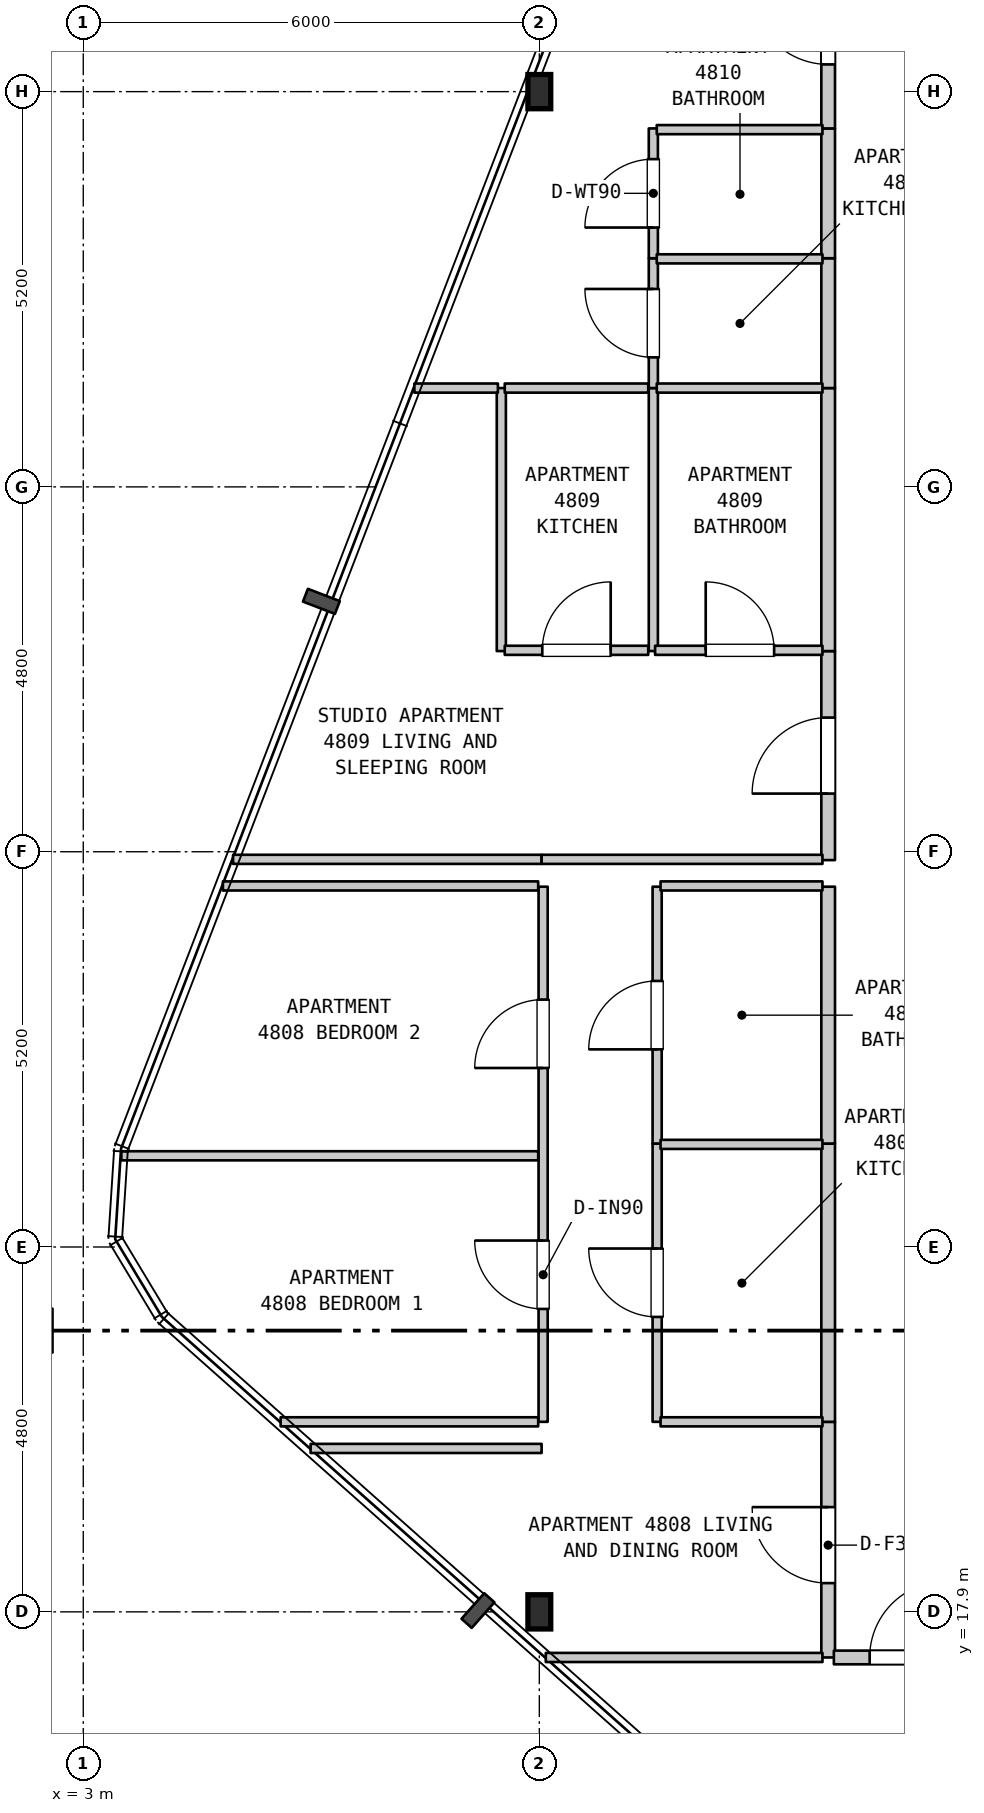
"""IFC4 building model, lengths in metres.
Left out: names, types, materials, properties, quantities, classifications, styles, units other than length and angle.
Written with IfcOpenShell. Run it as: python <this file> out.ifc"""

import sys

from ifc_helpers import new_model, si_unit, direction, frame, frame_2d, origin, origin_2d, place, context, subcontext, project, spatial, rectangle, i_section, extrude, element, fill, save


model = new_model("IFC4")
c1 = context("Model", 3, precision=1e-05, world=origin(), true_north=direction((0.0, 1.0)))
c2 = subcontext(c1, "Body", "Model", "MODEL_VIEW")
j1 = project(units=[si_unit("LENGTHUNIT", "METRE"), si_unit("PLANEANGLEUNIT", "RADIAN")], contexts=[c1])
p1 = place(None, origin())
s1 = spatial("IfcSite", under=j1, at=p1, CompositionType="ELEMENT")
p2 = place(p1, origin())
s2 = spatial("IfcBuilding", under=s1, at=p2, CompositionType="ELEMENT")
p3 = place(p2, frame((0.0, 0.0, 195.8)))
s3 = spatial("IfcBuildingStorey", under=s2, at=p3, CompositionType="ELEMENT", Elevation=195.8)
for number, where, z_axis, x_axis in (
    (1, (9.0, 17.9, 0.0), (0.0, 0.0, 1.0), (1.0, 0.0, 0.0)),
    (2, (9.0, 37.9, 0.0), (0.0, 0.0, 1.0), (1.0, 0.0, 0.0)),
):
    element("IfcColumn", number, at=place(p3, frame(where, z_axis=z_axis, x_axis=x_axis)), inside=s3, PredefinedType="COLUMN", context=c2, shape_type="SweptSolid", body=[
        extrude(i_section(OverallWidth=0.3, OverallDepth=0.45, WebThickness=0.014, FlangeThickness=0.026, FilletRadius=0.027, at=origin_2d()), origin(), (0.0, 0.0, 1.0), 3.7),
    ])
p4 = place(p3, frame((8.5, 30.54, 0.0), z_axis=(0.0, 0.0, 1.0), x_axis=(0.0, 1.0, 0.0)))
e3 = element("IfcWall", 3, at=p4, inside=s3, PredefinedType="PARTITIONING", context=c2, shape_type="SweptSolid", body=[
    extrude(rectangle(XDim=3.46, YDim=0.12, at=frame_2d((1.73, 0.0))), origin(), (0.0, 0.0, 1.0), 3.39),
])
p5 = place(p3, frame((9.05, 20.4, 0.0), z_axis=(0.0, 0.0, 1.0), x_axis=(0.0, 1.0, 0.0)))
e4 = element("IfcWall", 4, at=p5, inside=s3, PredefinedType="PARTITIONING", context=c2, shape_type="SweptSolid", body=[
    extrude(rectangle(XDim=7.04, YDim=0.12, at=frame_2d((3.52, 0.0))), origin(), (0.0, 0.0, 1.0), 2.79),
])
p6 = place(p5, frame((1.485, 0.0, 0.0)))
e5 = element("IfcOpeningElement", 5, at=p6, cuts=e4, PredefinedType="OPENING", context=c2, shape_type="SweptSolid", body=[
    extrude(rectangle(XDim=0.9, YDim=2.15, at=frame_2d((0.45, 1.075))), frame((0.0, 0.07, 0.0), z_axis=(0.0, -1.0, 0.0), x_axis=(1.0, 0.0, 0.0)), (0.0, 0.0, 1.0), 0.14),
])
p7 = place(p5, frame((4.655, 0.0, 0.0)))
e6 = element("IfcOpeningElement", 6, at=p7, cuts=e4, PredefinedType="OPENING", context=c2, shape_type="SweptSolid", body=[
    extrude(rectangle(XDim=0.9, YDim=2.15, at=frame_2d((0.45, 1.075))), frame((0.0, 0.07, 0.0), z_axis=(0.0, -1.0, 0.0), x_axis=(1.0, 0.0, 0.0)), (0.0, 0.0, 1.0), 0.14),
])
p8 = place(p3, frame((10.5, 30.54, 0.0), z_axis=(0.0, 0.0, 1.0), x_axis=(0.0, 1.0, 0.0)))
e7 = element("IfcWall", 7, at=p8, inside=s3, PredefinedType="PARTITIONING", context=c2, shape_type="SweptSolid", body=[
    extrude(rectangle(XDim=3.46, YDim=0.12, at=frame_2d((1.73, 0.0))), origin(), (0.0, 0.0, 1.0), 3.39),
])
p9 = place(p3, frame((10.5, 34.0, 0.0), z_axis=(0.0, 0.0, 1.0), x_axis=(0.0, 1.0, 0.0)))
e8 = element("IfcWall", 8, at=p9, inside=s3, PredefinedType="PARTITIONING", context=c2, shape_type="SweptSolid", body=[
    extrude(rectangle(XDim=1.708, YDim=0.12, at=frame_2d((0.854, 0.0))), origin(), (0.0, 0.0, 1.0), 3.39),
])
p10 = place(p9, frame((0.404, 0.0, 0.0)))
e9 = element("IfcOpeningElement", 9, at=p10, cuts=e8, PredefinedType="OPENING", context=c2, shape_type="SweptSolid", body=[
    extrude(rectangle(XDim=0.9, YDim=2.15, at=frame_2d((0.45, 1.075))), frame((0.0, 0.07, 0.0), z_axis=(0.0, -1.0, 0.0), x_axis=(1.0, 0.0, 0.0)), (0.0, 0.0, 1.0), 0.14),
])
p11 = place(p3, frame((10.5, 35.708, 0.0), z_axis=(0.0, 0.0, 1.0), x_axis=(0.0, 1.0, 0.0)))
e10 = element("IfcWall", 10, at=p11, inside=s3, PredefinedType="PARTITIONING", context=c2, shape_type="SweptSolid", body=[
    extrude(rectangle(XDim=1.708, YDim=0.12, at=frame_2d((0.854, 0.0))), origin(), (0.0, 0.0, 1.0), 3.39),
])
p12 = place(p11, frame((0.404, 0.0, 0.0)))
e11 = element("IfcOpeningElement", 11, at=p12, cuts=e10, PredefinedType="OPENING", context=c2, shape_type="SweptSolid", body=[
    extrude(rectangle(XDim=0.9, YDim=2.1, at=frame_2d((0.45, 1.05))), frame((0.0, 0.07, 0.0), z_axis=(0.0, -1.0, 0.0), x_axis=(1.0, 0.0, 0.0)), (0.0, 0.0, 1.0), 0.14),
])
p13 = place(p3, frame((10.55, 20.4, 0.0), z_axis=(0.0, 0.0, 1.0), x_axis=(0.0, 1.0, 0.0)))
e12 = element("IfcWall", 12, at=p13, inside=s3, PredefinedType="PARTITIONING", context=c2, shape_type="SweptSolid", body=[
    extrude(rectangle(XDim=3.661, YDim=0.12, at=frame_2d((1.831, 0.0))), origin(), (0.0, 0.0, 1.0), 3.39),
])
p14 = place(p13, frame((1.38, 0.0, 0.0)))
e13 = element("IfcOpeningElement", 13, at=p14, cuts=e12, PredefinedType="OPENING", context=c2, shape_type="SweptSolid", body=[
    extrude(rectangle(XDim=0.9, YDim=2.15, at=frame_2d((0.45, 1.075))), frame((0.0, 0.07, 0.0), z_axis=(0.0, -1.0, 0.0), x_axis=(1.0, 0.0, 0.0)), (0.0, 0.0, 1.0), 0.14),
])
p15 = place(p3, frame((10.55, 24.061, 0.0), z_axis=(0.0, 0.0, 1.0), x_axis=(0.0, 1.0, 0.0)))
e14 = element("IfcWall", 14, at=p15, inside=s3, PredefinedType="PARTITIONING", context=c2, shape_type="SweptSolid", body=[
    extrude(rectangle(XDim=3.379, YDim=0.12, at=frame_2d((1.689, 0.0))), origin(), (0.0, 0.0, 1.0), 3.39),
])
p16 = place(p15, frame((1.239, 0.0, 0.0)))
e15 = element("IfcOpeningElement", 15, at=p16, cuts=e14, PredefinedType="OPENING", context=c2, shape_type="SweptSolid", body=[
    extrude(rectangle(XDim=0.9, YDim=2.1, at=frame_2d((0.45, 1.05))), frame((0.0, 0.07, 0.0), z_axis=(0.0, -1.0, 0.0), x_axis=(1.0, 0.0, 0.0)), (0.0, 0.0, 1.0), 0.14),
])
p17 = place(p3, frame((12.8, 17.3, 0.0), z_axis=(0.0, 0.0, 1.0), x_axis=(0.0, 1.0, 0.0)))
e16 = element("IfcWall", 16, at=p17, inside=s3, PredefinedType="STANDARD", context=c2, shape_type="SweptSolid", body=[
    extrude(rectangle(XDim=3.1, YDim=0.18, at=frame_2d((1.55, 0.0))), origin(), (0.0, 0.0, 1.0), 3.39),
])
p18 = place(p17, frame((0.978, 0.0, 0.0)))
e17 = element("IfcOpeningElement", 17, at=p18, cuts=e16, PredefinedType="OPENING", context=c2, shape_type="SweptSolid", body=[
    extrude(rectangle(XDim=1.0, YDim=2.15, at=frame_2d((0.5, 1.075))), frame((0.0, 0.1, 0.0), z_axis=(0.0, -1.0, 0.0), x_axis=(1.0, 0.0, 0.0)), (0.0, 0.0, 1.0), 0.2),
])
p19 = place(p3, frame((12.8, 20.4, 0.0), z_axis=(0.0, 0.0, 1.0), x_axis=(0.0, 1.0, 0.0)))
e18 = element("IfcWall", 18, at=p19, inside=s3, PredefinedType="STANDARD", context=c2, shape_type="SweptSolid", body=[
    extrude(rectangle(XDim=3.661, YDim=0.18, at=frame_2d((1.831, 0.0))), origin(), (0.0, 0.0, 1.0), 3.39),
])
p20 = place(p3, frame((12.8, 24.061, 0.0), z_axis=(0.0, 0.0, 1.0), x_axis=(0.0, 1.0, 0.0)))
e19 = element("IfcWall", 19, at=p20, inside=s3, PredefinedType="STANDARD", context=c2, shape_type="SweptSolid", body=[
    extrude(rectangle(XDim=3.379, YDim=0.18, at=frame_2d((1.689, 0.0))), origin(), (0.0, 0.0, 1.0), 3.39),
])
p21 = place(p3, frame((12.8, 27.79, 0.0), z_axis=(0.0, 0.0, 1.0), x_axis=(0.0, 1.0, 0.0)))
e20 = element("IfcWall", 20, at=p21, inside=s3, PredefinedType="STANDARD", context=c2, shape_type="SweptSolid", body=[
    extrude(rectangle(XDim=2.75, YDim=0.18, at=frame_2d((1.375, 0.0))), origin(), (0.0, 0.0, 1.0), 3.39),
])
p22 = place(p21, frame((0.875, 0.0, 0.0)))
e21 = element("IfcOpeningElement", 21, at=p22, cuts=e20, PredefinedType="OPENING", context=c2, shape_type="SweptSolid", body=[
    extrude(rectangle(XDim=1.0, YDim=2.15, at=frame_2d((0.5, 1.075))), frame((0.0, 0.1, 0.0), z_axis=(0.0, -1.0, 0.0), x_axis=(1.0, 0.0, 0.0)), (0.0, 0.0, 1.0), 0.2),
])
p23 = place(p3, frame((12.8, 30.54, 0.0), z_axis=(0.0, 0.0, 1.0), x_axis=(0.0, 1.0, 0.0)))
e22 = element("IfcWall", 22, at=p23, inside=s3, PredefinedType="STANDARD", context=c2, shape_type="SweptSolid", body=[
    extrude(rectangle(XDim=3.46, YDim=0.18, at=frame_2d((1.73, 0.0))), origin(), (0.0, 0.0, 1.0), 3.39),
])
for number, where, z_axis, x_axis in (
    (23, (12.8, 34.0, 0.0), (0.0, 0.0, 1.0), (0.0, 1.0, 0.0)),
    (24, (12.8, 35.708, 0.0), (0.0, 0.0, 1.0), (0.0, 1.0, 0.0)),
):
    element("IfcWall", number, at=place(p3, frame(where, z_axis=z_axis, x_axis=x_axis)), inside=s3, PredefinedType="STANDARD", context=c2, shape_type="SweptSolid", body=[
        extrude(rectangle(XDim=1.708, YDim=0.18, at=frame_2d((0.854, 0.0))), origin(), (0.0, 0.0, 1.0), 3.39),
    ])
p24 = place(p3, frame((12.8, 37.416, 0.0), z_axis=(0.0, 0.0, 1.0), x_axis=(0.0, 1.0, 0.0)))
e25 = element("IfcWall", 25, at=p24, inside=s3, PredefinedType="STANDARD", context=c2, shape_type="SweptSolid", body=[
    extrude(rectangle(XDim=2.684, YDim=0.18, at=frame_2d((1.342, 0.0))), origin(), (0.0, 0.0, 1.0), 3.39),
])
p25 = place(p24, frame((0.842, 0.0, 0.0)))
e26 = element("IfcOpeningElement", 26, at=p25, cuts=e25, PredefinedType="OPENING", context=c2, shape_type="SweptSolid", body=[
    extrude(rectangle(XDim=1.0, YDim=2.15, at=frame_2d((0.5, 1.075))), frame((0.0, 0.1, 0.0), z_axis=(0.0, -1.0, 0.0), x_axis=(1.0, 0.0, 0.0)), (0.0, 0.0, 1.0), 0.2),
])
p26 = place(p3, frame((9.085, 17.3, 0.0), z_axis=(0.0, 0.0, 1.0), x_axis=(1.0, 0.0, 0.0)))
e27 = element("IfcWall", 27, at=p26, inside=s3, PredefinedType="PARTITIONING", context=c2, shape_type="SweptSolid", body=[
    extrude(rectangle(XDim=3.64, YDim=0.12, at=frame_2d((1.82, 0.0))), origin(), (0.0, 0.0, 1.0), 3.39),
])
p27 = place(p3, frame((12.875, 17.3, 0.0), z_axis=(0.0, 0.0, 1.0), x_axis=(1.0, 0.0, 0.0)))
e28 = element("IfcWall", 28, at=p27, inside=s3, PredefinedType="STANDARD", context=c2, shape_type="SweptSolid", body=[
    extrude(rectangle(XDim=3.28, YDim=0.18, at=frame_2d((1.64, 0.0))), origin(), (0.0, 0.0, 1.0), 3.39),
])
p28 = place(p27, frame((0.471, 0.0, 0.0)))
e29 = element("IfcOpeningElement", 29, at=p28, cuts=e28, PredefinedType="OPENING", context=c2, shape_type="SweptSolid", body=[
    extrude(rectangle(XDim=1.0, YDim=2.15, at=frame_2d((0.5, 1.075))), frame((0.0, 0.1, 0.0), z_axis=(0.0, -1.0, 0.0), x_axis=(1.0, 0.0, 0.0)), (0.0, 0.0, 1.0), 0.2),
])
p29 = place(p3, frame((5.991, 20.05, 0.0), z_axis=(0.0, 0.0, 1.0), x_axis=(1.0, 0.0, 0.0)))
e30 = element("IfcWall", 30, at=p29, inside=s3, PredefinedType="PARTITIONING", context=c2, shape_type="SweptSolid", body=[
    extrude(rectangle(XDim=3.039, YDim=0.12, at=frame_2d((1.52, 0.0))), origin(), (0.0, 0.0, 1.0), 3.39),
])
p30 = place(p3, frame((5.597, 20.4, 0.0), z_axis=(0.0, 0.0, 1.0), x_axis=(1.0, 0.0, 0.0)))
e31 = element("IfcWall", 31, at=p30, inside=s3, PredefinedType="PARTITIONING", context=c2, shape_type="SweptSolid", body=[
    extrude(rectangle(XDim=3.388, YDim=0.12, at=frame_2d((1.694, 0.0))), origin(), (0.0, 0.0, 1.0), 3.39),
])
p31 = place(p3, frame((10.595, 20.4, 0.0), z_axis=(0.0, 0.0, 1.0), x_axis=(1.0, 0.0, 0.0)))
e32 = element("IfcWall", 32, at=p31, inside=s3, PredefinedType="PARTITIONING", context=c2, shape_type="SweptSolid", body=[
    extrude(rectangle(XDim=2.13, YDim=0.12, at=frame_2d((1.065, 0.0))), origin(), (0.0, 0.0, 1.0), 3.39),
])
p32 = place(p3, frame((3.501, 23.9, 0.0), z_axis=(0.0, 0.0, 1.0), x_axis=(1.0, 0.0, 0.0)))
e33 = element("IfcWall", 33, at=p32, inside=s3, PredefinedType="PARTITIONING", context=c2, shape_type="SweptSolid", body=[
    extrude(rectangle(XDim=5.484, YDim=0.12, at=frame_2d((2.742, 0.0))), origin(), (0.0, 0.0, 1.0), 3.39),
])
p33 = place(p3, frame((10.595, 24.05, 0.0), z_axis=(0.0, 0.0, 1.0), x_axis=(1.0, 0.0, 0.0)))
e34 = element("IfcWall", 34, at=p33, inside=s3, PredefinedType="PARTITIONING", context=c2, shape_type="SweptSolid", body=[
    extrude(rectangle(XDim=2.13, YDim=0.12, at=frame_2d((1.065, 0.0))), origin(), (0.0, 0.0, 1.0), 3.39),
])
p34 = place(p3, frame((4.837, 27.45, 0.0), z_axis=(0.0, 0.0, 1.0), x_axis=(1.0, 0.0, 0.0)))
e35 = element("IfcWall", 35, at=p34, inside=s3, PredefinedType="PARTITIONING", context=c2, shape_type="SweptSolid", body=[
    extrude(rectangle(XDim=4.148, YDim=0.12, at=frame_2d((2.074, 0.0))), origin(), (0.0, 0.0, 1.0), 3.39),
])
p35 = place(p3, frame((10.595, 27.45, 0.0), z_axis=(0.0, 0.0, 1.0), x_axis=(1.0, 0.0, 0.0)))
e36 = element("IfcWall", 36, at=p35, inside=s3, PredefinedType="PARTITIONING", context=c2, shape_type="SweptSolid", body=[
    extrude(rectangle(XDim=2.13, YDim=0.12, at=frame_2d((1.065, 0.0))), origin(), (0.0, 0.0, 1.0), 3.39),
])
p36 = place(p3, frame((4.971, 27.8, 0.0), z_axis=(0.0, 0.0, 1.0), x_axis=(1.0, 0.0, 0.0)))
e37 = element("IfcWall", 37, at=p36, inside=s3, PredefinedType="PARTITIONING", context=c2, shape_type="SweptSolid", body=[
    extrude(rectangle(XDim=4.059, YDim=0.12, at=frame_2d((2.03, 0.0))), origin(), (0.0, 0.0, 1.0), 3.39),
])
p37 = place(p3, frame((9.03, 27.8, 0.0), z_axis=(0.0, 0.0, 1.0), x_axis=(1.0, 0.0, 0.0)))
e38 = element("IfcWall", 38, at=p37, inside=s3, PredefinedType="PARTITIONING", context=c2, shape_type="SweptSolid", body=[
    extrude(rectangle(XDim=3.695, YDim=0.12, at=frame_2d((1.848, 0.0))), origin(), (0.0, 0.0, 1.0), 3.39),
])
p38 = place(p3, frame((8.545, 30.55, 0.0), z_axis=(0.0, 0.0, 1.0), x_axis=(1.0, 0.0, 0.0)))
e39 = element("IfcWall", 39, at=p38, inside=s3, PredefinedType="PARTITIONING", context=c2, shape_type="SweptSolid", body=[
    extrude(rectangle(XDim=1.888, YDim=0.12, at=frame_2d((0.944, 0.0))), origin(), (0.0, 0.0, 1.0), 3.39),
])
p39 = place(p38, frame((0.494, 0.0, 0.0)))
e40 = element("IfcOpeningElement", 40, at=p39, cuts=e39, PredefinedType="OPENING", context=c2, shape_type="SweptSolid", body=[
    extrude(rectangle(XDim=0.9, YDim=2.15, at=frame_2d((0.45, 1.075))), frame((0.0, 0.07, 0.0), z_axis=(0.0, -1.0, 0.0), x_axis=(1.0, 0.0, 0.0)), (0.0, 0.0, 1.0), 0.14),
])
p40 = place(p3, frame((10.523, 30.55, 0.0), z_axis=(0.0, 0.0, 1.0), x_axis=(1.0, 0.0, 0.0)))
e41 = element("IfcWall", 41, at=p40, inside=s3, PredefinedType="PARTITIONING", context=c2, shape_type="SweptSolid", body=[
    extrude(rectangle(XDim=2.202, YDim=0.12, at=frame_2d((1.101, 0.0))), origin(), (0.0, 0.0, 1.0), 3.39),
])
p41 = place(p40, frame((0.666, 0.0, 0.0)))
e42 = element("IfcOpeningElement", 42, at=p41, cuts=e41, PredefinedType="OPENING", context=c2, shape_type="SweptSolid", body=[
    extrude(rectangle(XDim=0.9, YDim=2.1, at=frame_2d((0.45, 1.05))), frame((0.0, 0.07, 0.0), z_axis=(0.0, -1.0, 0.0), x_axis=(1.0, 0.0, 0.0)), (0.0, 0.0, 1.0), 0.14),
])
p42 = place(p3, frame((7.356, 34.0, 0.0), z_axis=(0.0, 0.0, 1.0), x_axis=(1.0, 0.0, 0.0)))
e43 = element("IfcWall", 43, at=p42, inside=s3, PredefinedType="PARTITIONING", context=c2, shape_type="SweptSolid", body=[
    extrude(rectangle(XDim=1.099, YDim=0.12, at=frame_2d((0.55, 0.0))), origin(), (0.0, 0.0, 1.0), 3.39),
])
p43 = place(p3, frame((8.545, 34.0, 0.0), z_axis=(0.0, 0.0, 1.0), x_axis=(1.0, 0.0, 0.0)))
e44 = element("IfcWall", 44, at=p43, inside=s3, PredefinedType="PARTITIONING", context=c2, shape_type="SweptSolid", body=[
    extrude(rectangle(XDim=1.888, YDim=0.12, at=frame_2d((0.944, 0.0))), origin(), (0.0, 0.0, 1.0), 3.39),
])
for number, where, z_axis, x_axis in (
    (45, (10.545, 34.0, 0.0), (0.0, 0.0, 1.0), (1.0, 0.0, 0.0)),
    (46, (10.545, 35.7, 0.0), (0.0, 0.0, 1.0), (1.0, 0.0, 0.0)),
    (47, (10.545, 37.4, 0.0), (0.0, 0.0, 1.0), (1.0, 0.0, 0.0)),
):
    element("IfcWall", number, at=place(p3, frame(where, z_axis=z_axis, x_axis=x_axis)), inside=s3, PredefinedType="PARTITIONING", context=c2, shape_type="SweptSolid", body=[
        extrude(rectangle(XDim=2.18, YDim=0.12, at=frame_2d((1.09, 0.0))), origin(), (0.0, 0.0, 1.0), 3.39),
    ])
p44 = place(p6, origin())
e48 = element("IfcDoor", 48, at=p44, inside=s3, OperationType="SINGLE_SWING_RIGHT", PredefinedType="DOOR", context=c2, shape_type="SweptSolid", body=[
    extrude(rectangle(XDim=0.9, YDim=2.15, at=frame_2d((0.45, 1.075))), frame((0.0, 0.025, 0.0), z_axis=(0.0, -1.0, 0.0), x_axis=(1.0, 0.0, 0.0)), (0.0, 0.0, 1.0), 0.05),
])
fill(e5, e48)
p45 = place(p7, origin())
e49 = element("IfcDoor", 49, at=p45, inside=s3, OperationType="SINGLE_SWING_LEFT", PredefinedType="DOOR", context=c2, shape_type="SweptSolid", body=[
    extrude(rectangle(XDim=0.9, YDim=2.15, at=frame_2d((0.45, 1.075))), frame((0.0, 0.025, 0.0), z_axis=(0.0, -1.0, 0.0), x_axis=(1.0, 0.0, 0.0)), (0.0, 0.0, 1.0), 0.05),
])
fill(e6, e49)
p46 = place(p10, origin())
e50 = element("IfcDoor", 50, at=p46, inside=s3, OperationType="SINGLE_SWING_RIGHT", PredefinedType="DOOR", context=c2, shape_type="SweptSolid", body=[
    extrude(rectangle(XDim=0.9, YDim=2.15, at=frame_2d((0.45, 1.075))), frame((0.0, 0.025, 0.0), z_axis=(0.0, -1.0, 0.0), x_axis=(1.0, 0.0, 0.0)), (0.0, 0.0, 1.0), 0.05),
])
fill(e9, e50)
p47 = place(p12, origin())
e51 = element("IfcDoor", 51, at=p47, inside=s3, OperationType="SINGLE_SWING_LEFT", PredefinedType="DOOR", context=c2, shape_type="SweptSolid", body=[
    extrude(rectangle(XDim=0.9, YDim=2.1, at=frame_2d((0.45, 1.05))), frame((0.0, 0.025, 0.0), z_axis=(0.0, -1.0, 0.0), x_axis=(1.0, 0.0, 0.0)), (0.0, 0.0, 1.0), 0.05),
])
fill(e11, e51)
p48 = place(p14, origin())
e52 = element("IfcDoor", 52, at=p48, inside=s3, OperationType="SINGLE_SWING_RIGHT", PredefinedType="DOOR", context=c2, shape_type="SweptSolid", body=[
    extrude(rectangle(XDim=0.9, YDim=2.15, at=frame_2d((0.45, 1.075))), frame((0.0, 0.025, 0.0), z_axis=(0.0, -1.0, 0.0), x_axis=(1.0, 0.0, 0.0)), (0.0, 0.0, 1.0), 0.05),
])
fill(e13, e52)
p49 = place(p16, origin())
e53 = element("IfcDoor", 53, at=p49, inside=s3, OperationType="SINGLE_SWING_LEFT", PredefinedType="DOOR", context=c2, shape_type="SweptSolid", body=[
    extrude(rectangle(XDim=0.9, YDim=2.1, at=frame_2d((0.45, 1.05))), frame((0.0, 0.025, 0.0), z_axis=(0.0, -1.0, 0.0), x_axis=(1.0, 0.0, 0.0)), (0.0, 0.0, 1.0), 0.05),
])
fill(e15, e53)
p50 = place(p18, origin())
e54 = element("IfcDoor", 54, at=p50, inside=s3, OperationType="SINGLE_SWING_RIGHT", PredefinedType="DOOR", context=c2, shape_type="SweptSolid", body=[
    extrude(rectangle(XDim=1.0, YDim=2.15, at=frame_2d((0.5, 1.075))), frame((0.0, 0.025, 0.0), z_axis=(0.0, -1.0, 0.0), x_axis=(1.0, 0.0, 0.0)), (0.0, 0.0, 1.0), 0.05),
])
fill(e17, e54)
p51 = place(p22, origin())
e55 = element("IfcDoor", 55, at=p51, inside=s3, OperationType="SINGLE_SWING_LEFT", PredefinedType="DOOR", context=c2, shape_type="SweptSolid", body=[
    extrude(rectangle(XDim=1.0, YDim=2.15, at=frame_2d((0.5, 1.075))), frame((0.0, 0.025, 0.0), z_axis=(0.0, -1.0, 0.0), x_axis=(1.0, 0.0, 0.0)), (0.0, 0.0, 1.0), 0.05),
])
fill(e21, e55)
p52 = place(p25, origin())
e56 = element("IfcDoor", 56, at=p52, inside=s3, OperationType="SINGLE_SWING_RIGHT", PredefinedType="DOOR", context=c2, shape_type="SweptSolid", body=[
    extrude(rectangle(XDim=1.0, YDim=2.15, at=frame_2d((0.5, 1.075))), frame((0.0, 0.025, 0.0), z_axis=(0.0, -1.0, 0.0), x_axis=(1.0, 0.0, 0.0)), (0.0, 0.0, 1.0), 0.05),
])
fill(e26, e56)
p53 = place(p28, origin())
e57 = element("IfcDoor", 57, at=p53, inside=s3, OperationType="SINGLE_SWING_RIGHT", PredefinedType="DOOR", context=c2, shape_type="SweptSolid", body=[
    extrude(rectangle(XDim=1.0, YDim=2.15, at=frame_2d((0.5, 1.075))), frame((0.0, 0.025, 0.0), z_axis=(0.0, -1.0, 0.0), x_axis=(1.0, 0.0, 0.0)), (0.0, 0.0, 1.0), 0.05),
])
fill(e29, e57)
p54 = place(p39, origin())
e58 = element("IfcDoor", 58, at=p54, inside=s3, OperationType="SINGLE_SWING_RIGHT", PredefinedType="DOOR", context=c2, shape_type="SweptSolid", body=[
    extrude(rectangle(XDim=0.9, YDim=2.15, at=frame_2d((0.45, 1.075))), frame((0.0, 0.025, 0.0), z_axis=(0.0, -1.0, 0.0), x_axis=(1.0, 0.0, 0.0)), (0.0, 0.0, 1.0), 0.05),
])
fill(e40, e58)
p55 = place(p41, origin())
e59 = element("IfcDoor", 59, at=p55, inside=s3, OperationType="SINGLE_SWING_LEFT", PredefinedType="DOOR", context=c2, shape_type="SweptSolid", body=[
    extrude(rectangle(XDim=0.9, YDim=2.1, at=frame_2d((0.45, 1.05))), frame((0.0, 0.025, 0.0), z_axis=(0.0, -1.0, 0.0), x_axis=(1.0, 0.0, 0.0)), (0.0, 0.0, 1.0), 0.05),
])
fill(e42, e59)
save(model, sys.argv[1])
